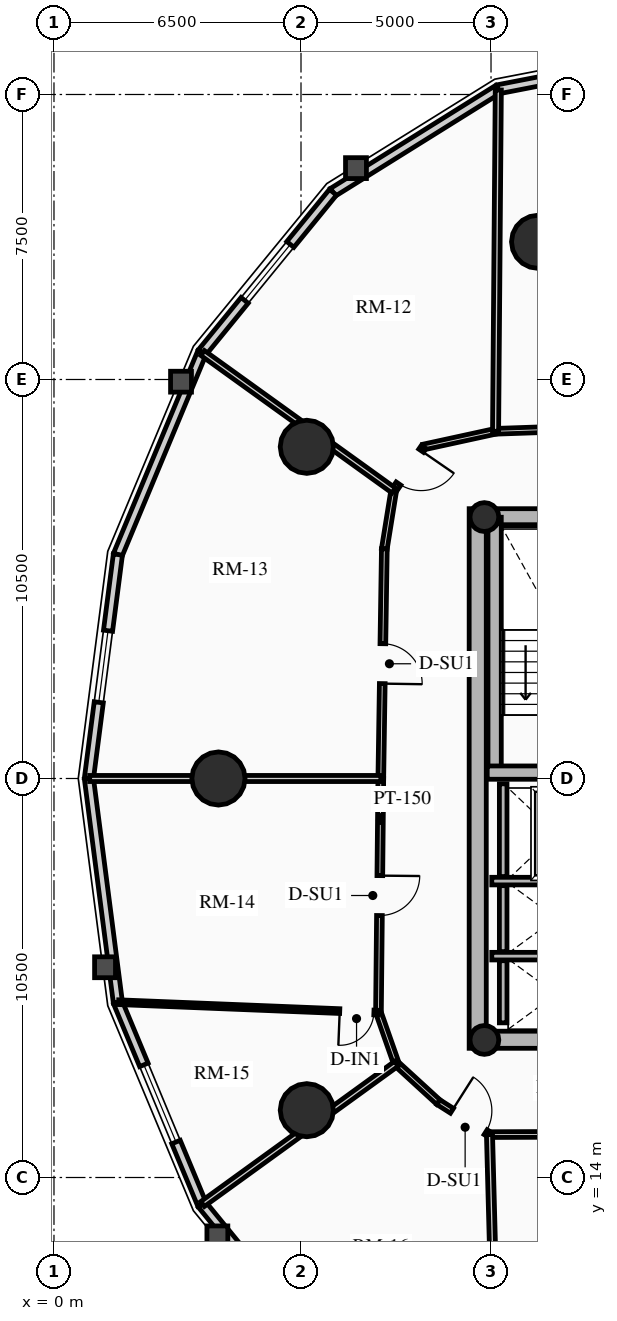
"""IFC4 building model, lengths in metres.
Left out: names, types, materials, properties, quantities, classifications, styles, units other than length and angle.
Written with IfcOpenShell. Run it as: python <this file> out.ifc"""

import sys

from ifc_helpers import new_model, si_unit, direction, frame, frame_2d, origin, origin_2d, place, context, subcontext, project, spatial, rectangle, circle, hollow_circle, extrude, source, transform, mapped, element, fill, save


model = new_model("IFC4")
c1 = context("Model", 3, precision=1e-05, world=origin(), true_north=direction((0.0, 1.0)))
c2 = subcontext(c1, "Body", "Model", "MODEL_VIEW")
j1 = project(units=[si_unit("LENGTHUNIT", "METRE"), si_unit("PLANEANGLEUNIT", "RADIAN")], contexts=[c1])
p1 = place(None, origin())
s1 = spatial("IfcSite", under=j1, at=p1, CompositionType="ELEMENT")
p2 = place(p1, origin())
s2 = spatial("IfcBuilding", under=s1, at=p2, CompositionType="ELEMENT")
p3 = place(p2, frame((0.0, 0.0, 81.79)))
s3 = spatial("IfcBuildingStorey", under=s2, at=p3, CompositionType="ELEMENT", Elevation=81.79)
p4 = place(p3, frame((11.15, 17.4, 0.0), z_axis=(0.0, 0.0, 1.0), x_axis=(0.0, 1.0, 0.0)))
e1 = element("IfcWall", 1, at=p4, inside=s3, PredefinedType="SHEAR", context=c2, shape_type="SweptSolid", body=[
    extrude(rectangle(XDim=14.2, YDim=0.45, at=frame_2d((7.1, 0.0))), origin(), (0.0, 0.0, 1.0), 2.91),
])
p5 = place(p3, frame((11.15, 17.625, 0.0), z_axis=(0.0, 0.0, 1.0), x_axis=(1.0, 0.0, 0.0)))
e2 = element("IfcWall", 2, at=p5, inside=s3, PredefinedType="SHEAR", context=c2, shape_type="SweptSolid", body=[
    extrude(rectangle(XDim=10.7, YDim=0.45, at=frame_2d((5.35, 0.0))), origin(), (0.0, 0.0, 1.0), 2.91),
])
m1 = source(origin(), c2, "Body", "SweptSolid", [
    extrude(rectangle(XDim=1.5, YDim=2.02, at=frame_2d((0.75, 1.01))), frame((0.0, 0.235, 0.0), z_axis=(0.0, -1.0, 0.0), x_axis=(1.0, 0.0, 0.0)), (0.0, 0.0, 1.0), 0.47),
])
p6 = place(p5, frame((5.45, 0.0, 0.0)))
e3 = element("IfcOpeningElement", 3, at=p6, cuts=e2, PredefinedType="OPENING", context=c2, shape_type="MappedRepresentation", body=[
    mapped(m1, transform((0.0, 0.0, 0.0), x_axis=(1.0, 0.0, 0.0), y_axis=(0.0, 1.0, 0.0), z_axis=(0.0, 0.0, 1.0), scale=1.0)),
])
p7 = place(p3, frame((11.15, 31.375, 0.0), z_axis=(0.0, 0.0, 1.0), x_axis=(1.0, 0.0, 0.0)))
e4 = element("IfcWall", 4, at=p7, inside=s3, PredefinedType="SHEAR", context=c2, shape_type="SweptSolid", body=[
    extrude(rectangle(XDim=10.7, YDim=0.45, at=frame_2d((5.35, 0.0))), origin(), (0.0, 0.0, 1.0), 2.91),
])
p8 = place(p7, frame((4.6, 0.0, 0.0)))
e5 = element("IfcOpeningElement", 5, at=p8, cuts=e4, PredefinedType="OPENING", context=c2, shape_type="MappedRepresentation", body=[
    mapped(m1, transform((0.0, 0.0, 0.0), x_axis=(1.0, 0.0, 0.0), y_axis=(0.0, 1.0, 0.0), z_axis=(0.0, 0.0, 1.0), scale=1.0)),
])
p9 = place(p3, frame((11.595, 24.655, 0.0), z_axis=(0.0, 0.0, 1.0), x_axis=(0.0, 1.0, 0.0)))
e6 = element("IfcWall", 6, at=p9, inside=s3, PredefinedType="SHEAR", context=c2, shape_type="SweptSolid", body=[
    extrude(rectangle(XDim=6.72, YDim=0.35, at=frame_2d((3.36, 0.0))), origin(), (0.0, 0.0, 1.0), 2.91),
])
p10 = place(p3, frame((11.4, 24.655, 0.0), z_axis=(0.0, 0.0, 1.0), x_axis=(1.0, 0.0, 0.0)))
e7 = element("IfcWall", 7, at=p10, inside=s3, PredefinedType="SHEAR", context=c2, shape_type="SweptSolid", body=[
    extrude(rectangle(XDim=3.285, YDim=0.35, at=frame_2d((1.643, 0.0))), origin(), (0.0, 0.0, 1.0), 2.91),
])
for number, where, z_axis, x_axis in (
    (8, (11.325, 17.62, 0.0), (0.0, 0.0, 1.0), (1.0, 0.0, 0.0)),
    (9, (11.325, 31.38, 0.0), (0.0, 0.0, 1.0), (1.0, 0.0, 0.0)),
):
    element("IfcColumn", number, at=place(p3, frame(where, z_axis=z_axis, x_axis=x_axis)), inside=s3, PredefinedType="COLUMN", context=c2, shape_type="SweptSolid", body=[
        extrude(hollow_circle(Radius=0.38, WallThickness=0.032, at=origin_2d()), origin(), (0.0, 0.0, 1.0), 2.91),
    ])
for number, where, z_axis, x_axis in (
    (10, (12.739, 38.623, 0.0), (0.0, 0.0, 1.0), (1.0, 0.0, 0.0)),
    (11, (6.653, 33.229, 0.0), (0.0, 0.0, 1.0), (1.0, 0.0, 0.0)),
    (12, (4.328, 24.5, 0.0), (0.0, 0.0, 1.0), (1.0, 0.0, 0.0)),
    (13, (6.653, 15.771, 0.0), (0.0, 0.0, 1.0), (1.0, 0.0, 0.0)),
):
    element("IfcColumn", number, at=place(p3, frame(where, z_axis=z_axis, x_axis=x_axis)), inside=s3, PredefinedType="USERDEFINED", context=c2, shape_type="SweptSolid", body=[
        extrude(circle(Radius=0.7, at=origin_2d()), origin(), (0.0, 0.0, 1.0), 2.91),
    ])
p11 = place(p3, frame((11.685, 42.637, 0.0), z_axis=(0.0, 0.0, 1.0), x_axis=(0.981723785992, 0.190311344954, 0.0)))
e14 = element("IfcWall", 14, at=p11, inside=s3, PredefinedType="SOLIDWALL", context=c2, shape_type="SweptSolid", body=[
    extrude(rectangle(XDim=4.904, YDim=0.24, at=frame_2d((2.452, 0.0))), origin(), (0.0, 0.0, 1.0), 2.179),
])
m2 = source(origin(), c2, "Body", "SweptSolid", [
    extrude(rectangle(XDim=2.2, YDim=1.35, at=frame_2d((1.1, 0.675))), frame((0.0, 0.13, 0.0), z_axis=(0.0, -1.0, 0.0), x_axis=(1.0, 0.0, 0.0)), (0.0, 0.0, 1.0), 0.26),
])
p12 = place(p11, frame((1.352, 0.0, 0.65)))
e15 = element("IfcOpeningElement", 15, at=p12, cuts=e14, PredefinedType="OPENING", context=c2, shape_type="MappedRepresentation", body=[
    mapped(m2, transform((0.0, 0.0, 0.0), x_axis=(1.0, 0.0, 0.0), y_axis=(0.0, 1.0, 0.0), z_axis=(0.0, 0.0, 1.0), scale=1.0)),
])
p13 = place(p3, frame((7.342, 39.928, 0.0), z_axis=(0.0, 0.0, 1.0), x_axis=(0.848520380187, 0.529162701263, 0.0)))
e16 = element("IfcWall", 16, at=p13, inside=s3, PredefinedType="SOLIDWALL", context=c2, shape_type="SweptSolid", body=[
    extrude(rectangle(XDim=5.119, YDim=0.24, at=frame_2d((2.56, 0.0))), origin(), (0.0, 0.0, 1.0), 2.179),
])
p14 = place(p3, frame((3.895, 35.709, 0.0), z_axis=(0.0, 0.0, 1.0), x_axis=(0.632700781152, 0.77439635945, 0.0)))
e17 = element("IfcWall", 17, at=p14, inside=s3, PredefinedType="SOLIDWALL", context=c2, shape_type="SweptSolid", body=[
    extrude(rectangle(XDim=5.448, YDim=0.24, at=frame_2d((2.724, 0.0))), origin(), (0.0, 0.0, 1.0), 2.179),
])
m3 = source(origin(), c2, "Body", "SweptSolid", [
    extrude(rectangle(XDim=1.9, YDim=1.35, at=frame_2d((0.95, 0.675))), frame((0.0, 0.13, 0.0), z_axis=(0.0, -1.0, 0.0), x_axis=(1.0, 0.0, 0.0)), (0.0, 0.0, 1.0), 0.26),
])
p15 = place(p14, frame((1.774, 0.0, 0.65)))
e18 = element("IfcOpeningElement", 18, at=p15, cuts=e17, PredefinedType="OPENING", context=c2, shape_type="MappedRepresentation", body=[
    mapped(m3, transform((0.0, 0.0, 0.0), x_axis=(1.0, 0.0, 0.0), y_axis=(0.0, 1.0, 0.0), z_axis=(0.0, 0.0, 1.0), scale=1.0)),
])
p16 = place(p3, frame((1.682, 30.393, 0.0), z_axis=(0.0, 0.0, 1.0), x_axis=(0.384344417632, 0.923189779317, 0.0)))
e19 = element("IfcWall", 19, at=p16, inside=s3, PredefinedType="SOLIDWALL", context=c2, shape_type="SweptSolid", body=[
    extrude(rectangle(XDim=5.758, YDim=0.24, at=frame_2d((2.879, 0.0))), origin(), (0.0, 0.0, 1.0), 2.179),
])
p17 = place(p3, frame((0.919, 24.5, 0.0), z_axis=(0.0, 0.0, 1.0), x_axis=(0.128351991996, 0.991728675672, 0.0)))
e20 = element("IfcWall", 20, at=p17, inside=s3, PredefinedType="SOLIDWALL", context=c2, shape_type="SweptSolid", body=[
    extrude(rectangle(XDim=5.942, YDim=0.24, at=frame_2d((2.971, 0.0))), origin(), (0.0, 0.0, 1.0), 2.179),
])
p18 = place(p17, frame((2.021, 0.0, 0.65)))
e21 = element("IfcOpeningElement", 21, at=p18, cuts=e20, PredefinedType="OPENING", context=c2, shape_type="MappedRepresentation", body=[
    mapped(m3, transform((0.0, 0.0, 0.0), x_axis=(1.0, 0.0, 0.0), y_axis=(0.0, 1.0, 0.0), z_axis=(0.0, 0.0, 1.0), scale=1.0)),
])
p19 = place(p3, frame((1.682, 18.607, 0.0), z_axis=(0.0, 0.0, 1.0), x_axis=(-0.128351991996, 0.991728675672, 0.0)))
e22 = element("IfcWall", 22, at=p19, inside=s3, PredefinedType="SOLIDWALL", context=c2, shape_type="SweptSolid", body=[
    extrude(rectangle(XDim=5.942, YDim=0.24, at=frame_2d((2.971, 0.0))), origin(), (0.0, 0.0, 1.0), 2.179),
])
p20 = place(p3, frame((3.895, 13.291, 0.0), z_axis=(0.0, 0.0, 1.0), x_axis=(-0.384344417632, 0.923189779317, 0.0)))
e23 = element("IfcWall", 23, at=p20, inside=s3, PredefinedType="SOLIDWALL", context=c2, shape_type="SweptSolid", body=[
    extrude(rectangle(XDim=5.758, YDim=0.24, at=frame_2d((2.879, 0.0))), origin(), (0.0, 0.0, 1.0), 2.179),
])
p21 = place(p20, frame((1.779, 0.0, 0.65)))
e24 = element("IfcOpeningElement", 24, at=p21, cuts=e23, PredefinedType="OPENING", context=c2, shape_type="MappedRepresentation", body=[
    mapped(m2, transform((0.0, 0.0, 0.0), x_axis=(1.0, 0.0, 0.0), y_axis=(0.0, 1.0, 0.0), z_axis=(0.0, 0.0, 1.0), scale=1.0)),
])
p22 = place(p3, frame((7.342, 9.072, 0.0), z_axis=(0.0, 0.0, 1.0), x_axis=(-0.632700781152, 0.77439635945, 0.0)))
e25 = element("IfcWall", 25, at=p22, inside=s3, PredefinedType="SOLIDWALL", context=c2, shape_type="SweptSolid", body=[
    extrude(rectangle(XDim=5.448, YDim=0.24, at=frame_2d((2.724, 0.0))), origin(), (0.0, 0.0, 1.0), 2.179),
])
p23 = place(p3, frame((11.52, 21.8, 0.0), z_axis=(0.0, 0.0, 1.0), x_axis=(1.0, 0.0, 0.0)))
e26 = element("IfcWall", 26, at=p23, inside=s3, PredefinedType="SHEAR", context=c2, shape_type="SweptSolid", body=[
    extrude(rectangle(XDim=2.97, YDim=0.2, at=frame_2d((1.485, 0.0))), origin(), (0.0, 0.0, 1.0), 2.91),
])
p24 = place(p3, frame((11.82, 21.92, 0.0), z_axis=(0.0, 0.0, 1.0), x_axis=(0.0, 1.0, 0.0)))
e27 = element("IfcWall", 27, at=p24, inside=s3, PredefinedType="SHEAR", context=c2, shape_type="SweptSolid", body=[
    extrude(rectangle(XDim=2.44, YDim=0.2, at=frame_2d((1.22, 0.0))), origin(), (0.0, 0.0, 1.0), 2.91),
])
p25 = place(p3, frame((11.52, 19.825, 0.0), z_axis=(0.0, 0.0, 1.0), x_axis=(1.0, 0.0, 0.0)))
e28 = element("IfcWall", 28, at=p25, inside=s3, PredefinedType="SHEAR", context=c2, shape_type="SweptSolid", body=[
    extrude(rectangle(XDim=2.97, YDim=0.2, at=frame_2d((1.485, 0.0))), origin(), (0.0, 0.0, 1.0), 2.91),
])
p26 = place(p3, frame((11.82, 19.945, 0.0), z_axis=(0.0, 0.0, 1.0), x_axis=(0.0, 1.0, 0.0)))
e29 = element("IfcWall", 29, at=p26, inside=s3, PredefinedType="SHEAR", context=c2, shape_type="SweptSolid", body=[
    extrude(rectangle(XDim=1.735, YDim=0.2, at=frame_2d((0.867, 0.0))), origin(), (0.0, 0.0, 1.0), 2.91),
])
p27 = place(p3, frame((11.82, 18.07, 0.0), z_axis=(0.0, 0.0, 1.0), x_axis=(0.0, 1.0, 0.0)))
e30 = element("IfcWall", 30, at=p27, inside=s3, PredefinedType="SHEAR", context=c2, shape_type="SweptSolid", body=[
    extrude(rectangle(XDim=1.635, YDim=0.2, at=frame_2d((0.817, 0.0))), origin(), (0.0, 0.0, 1.0), 2.91),
])
p28 = place(p3, frame((18.143, 33.86, 0.0), z_axis=(0.0, 0.0, 1.0), x_axis=(-0.999419208319, -0.034077060363, 0.0)))
e31 = element("IfcWall", 31, at=p28, inside=s3, PredefinedType="PARTITIONING", context=c2, shape_type="SweptSolid", body=[
    extrude(rectangle(XDim=6.527, YDim=0.15, at=frame_2d((3.263, 0.0))), origin(), (0.0, 0.0, 1.0), 2.225),
])
m4 = source(origin(), c2, "Body", "SweptSolid", [
    extrude(rectangle(XDim=1.05, YDim=2.015, at=frame_2d((0.525, 1.007))), frame((0.0, 0.085, 0.0), z_axis=(0.0, -1.0, 0.0), x_axis=(1.0, 0.0, 0.0)), (0.0, 0.0, 1.0), 0.17),
])
p29 = place(p28, frame((2.738, 0.0, 0.0)))
e32 = element("IfcOpeningElement", 32, at=p29, cuts=e31, PredefinedType="OPENING", context=c2, shape_type="MappedRepresentation", body=[
    mapped(m4, transform((0.0, 0.0, 0.0), x_axis=(1.0, 0.0, 0.0), y_axis=(0.0, 1.0, 0.0), z_axis=(0.0, 0.0, 1.0), scale=1.0)),
])
p30 = place(p3, frame((11.62, 33.637, 0.0), z_axis=(0.0, 0.0, 1.0), x_axis=(-0.97702579435, -0.213121085711, 0.0)))
e33 = element("IfcWall", 33, at=p30, inside=s3, PredefinedType="PARTITIONING", context=c2, shape_type="SweptSolid", body=[
    extrude(rectangle(XDim=1.935, YDim=0.15, at=frame_2d((0.967, 0.0))), origin(), (0.0, 0.0, 1.0), 2.225),
])
p31 = place(p3, frame((9.729, 33.225, 0.0), z_axis=(0.0, 0.0, 1.0), x_axis=(-0.567183649484, -0.82359134755, 0.0)))
e34 = element("IfcWall", 34, at=p31, inside=s3, PredefinedType="PARTITIONING", context=c2, shape_type="SweptSolid", body=[
    extrude(rectangle(XDim=1.392, YDim=0.15, at=frame_2d((0.696, 0.0))), origin(), (0.0, 0.0, 1.0), 2.225),
])
p32 = place(p31, frame((0.12, 0.0, 0.0)))
e35 = element("IfcOpeningElement", 35, at=p32, cuts=e34, PredefinedType="OPENING", context=c2, shape_type="MappedRepresentation", body=[
    mapped(m4, transform((0.0, 0.0, 0.0), x_axis=(1.0, 0.0, 0.0), y_axis=(0.0, 1.0, 0.0), z_axis=(0.0, 0.0, 1.0), scale=1.0)),
])
p33 = place(p3, frame((8.94, 32.078, 0.0), z_axis=(0.0, 0.0, 1.0), x_axis=(-0.159148467753, -0.98725466077, 0.0)))
e36 = element("IfcWall", 36, at=p33, inside=s3, PredefinedType="PARTITIONING", context=c2, shape_type="SweptSolid", body=[
    extrude(rectangle(XDim=1.554, YDim=0.15, at=frame_2d((0.777, 0.0))), origin(), (0.0, 0.0, 1.0), 2.225),
])
p34 = place(p3, frame((8.693, 30.544, 0.0), z_axis=(0.0, 0.0, 1.0), x_axis=(-0.015307007986, -0.99988284089, 0.0)))
e37 = element("IfcWall", 37, at=p34, inside=s3, PredefinedType="PARTITIONING", context=c2, shape_type="SweptSolid", body=[
    extrude(rectangle(XDim=6.045, YDim=0.15, at=frame_2d((3.022, 0.0))), origin(), (0.0, 0.0, 1.0), 2.655),
])
p35 = place(p34, frame((2.497, 0.0, 0.0)))
e38 = element("IfcOpeningElement", 38, at=p35, cuts=e37, PredefinedType="OPENING", context=c2, shape_type="MappedRepresentation", body=[
    mapped(m4, transform((0.0, 0.0, 0.0), x_axis=(1.0, 0.0, 0.0), y_axis=(0.0, 1.0, 0.0), z_axis=(0.0, 0.0, 1.0), scale=1.0)),
])
p36 = place(p3, frame((8.6, 24.5, 0.0), z_axis=(0.0, 0.0, 1.0), x_axis=(-0.010023665349, -0.999949761805, 0.0)))
e39 = element("IfcWall", 39, at=p36, inside=s3, PredefinedType="PARTITIONING", context=c2, shape_type="SweptSolid", body=[
    extrude(rectangle(XDim=6.162, YDim=0.15, at=frame_2d((3.081, 0.0))), origin(), (0.0, 0.0, 1.0), 2.225),
])
p37 = place(p36, frame((2.556, 0.0, 0.0)))
e40 = element("IfcOpeningElement", 40, at=p37, cuts=e39, PredefinedType="OPENING", context=c2, shape_type="MappedRepresentation", body=[
    mapped(m4, transform((0.0, 0.0, 0.0), x_axis=(1.0, 0.0, 0.0), y_axis=(0.0, 1.0, 0.0), z_axis=(0.0, 0.0, 1.0), scale=1.0)),
])
p38 = place(p3, frame((8.538, 18.338, 0.0), z_axis=(0.0, 0.0, 1.0), x_axis=(0.331358150167, -0.94350504838, 0.0)))
e41 = element("IfcWall", 41, at=p38, inside=s3, PredefinedType="PARTITIONING", context=c2, shape_type="SweptSolid", body=[
    extrude(rectangle(XDim=1.424, YDim=0.15, at=frame_2d((0.712, 0.0))), origin(), (0.0, 0.0, 1.0), 2.225),
])
p39 = place(p3, frame((9.01, 16.994, 0.0), z_axis=(0.0, 0.0, 1.0), x_axis=(0.737701798986, -0.67512669609, 0.0)))
e42 = element("IfcWall", 42, at=p39, inside=s3, PredefinedType="PARTITIONING", context=c2, shape_type="SweptSolid", body=[
    extrude(rectangle(XDim=1.498, YDim=0.15, at=frame_2d((0.749, 0.0))), origin(), (0.0, 0.0, 1.0), 2.225),
])
p40 = place(p3, frame((10.115, 15.983, 0.0), z_axis=(0.0, 0.0, 1.0), x_axis=(0.843995849351, -0.536349705209, 0.0)))
e43 = element("IfcWall", 43, at=p40, inside=s3, PredefinedType="PARTITIONING", context=c2, shape_type="SweptSolid", body=[
    extrude(rectangle(XDim=1.593, YDim=0.15, at=frame_2d((0.796, 0.0))), origin(), (0.0, 0.0, 1.0), 2.225),
])
p41 = place(p40, frame((0.423, 0.0, 0.0)))
e44 = element("IfcOpeningElement", 44, at=p41, cuts=e43, PredefinedType="OPENING", context=c2, shape_type="MappedRepresentation", body=[
    mapped(m4, transform((0.0, 0.0, 0.0), x_axis=(1.0, 0.0, 0.0), y_axis=(0.0, 1.0, 0.0), z_axis=(0.0, 0.0, 1.0), scale=1.0)),
])
p42 = place(p3, frame((11.46, 15.129, 0.0), z_axis=(0.0, 0.0, 1.0), x_axis=(0.999993513287, 0.003601858435, 0.0)))
e45 = element("IfcWall", 45, at=p42, inside=s3, PredefinedType="PARTITIONING", context=c2, shape_type="SweptSolid", body=[
    extrude(rectangle(XDim=3.321, YDim=0.15, at=frame_2d((1.661, 0.0))), origin(), (0.0, 0.0, 1.0), 2.225),
])
p43 = place(p3, frame((11.62, 33.637, 0.0), z_axis=(0.0, 0.0, 1.0), x_axis=(0.007965167065, 0.999968277554, 0.0)))
e46 = element("IfcWall", 46, at=p43, inside=s3, PredefinedType="PARTITIONING", context=c2, shape_type="SweptSolid", body=[
    extrude(rectangle(XDim=8.981, YDim=0.16, at=frame_2d((4.49, 0.0))), origin(), (0.0, 0.0, 1.0), 2.179),
])
p44 = place(p3, frame((8.94, 32.078, 0.0), z_axis=(0.0, 0.0, 1.0), x_axis=(-0.811689023641, 0.584089829479, 0.0)))
e47 = element("IfcWall", 47, at=p44, inside=s3, PredefinedType="PARTITIONING", context=c2, shape_type="SweptSolid", body=[
    extrude(rectangle(XDim=6.196, YDim=0.16, at=frame_2d((3.098, 0.0))), origin(), (0.0, 0.0, 1.0), 2.179),
])
p45 = place(p3, frame((8.6, 24.5, 0.0), z_axis=(0.0, 0.0, 1.0), x_axis=(-1.0, 0.0, 0.0)))
e48 = element("IfcWall", 48, at=p45, inside=s3, PredefinedType="PARTITIONING", context=c2, shape_type="SweptSolid", body=[
    extrude(rectangle(XDim=7.661, YDim=0.16, at=frame_2d((3.831, 0.0))), origin(), (0.0, 0.0, 1.0), 2.179),
])
p46 = place(p3, frame((9.01, 16.994, 0.0), z_axis=(0.0, 0.0, 1.0), x_axis=(-0.81001707524, -0.586406290741, 0.0)))
e49 = element("IfcWall", 49, at=p46, inside=s3, PredefinedType="PARTITIONING", context=c2, shape_type="SweptSolid", body=[
    extrude(rectangle(XDim=6.295, YDim=0.16, at=frame_2d((3.148, 0.0))), origin(), (0.0, 0.0, 1.0), 2.179),
])
p47 = place(p3, frame((11.46, 15.129, 0.0), z_axis=(0.0, 0.0, 1.0), x_axis=(0.026480592098, -0.999649327636, 0.0)))
e50 = element("IfcWall", 50, at=p47, inside=s3, PredefinedType="PARTITIONING", context=c2, shape_type="SweptSolid", body=[
    extrude(rectangle(XDim=8.75, YDim=0.16, at=frame_2d((4.375, 0.0))), origin(), (0.0, 0.0, 1.0), 2.179),
])
p48 = place(p3, frame((8.538, 18.338, 0.0), z_axis=(0.0, 0.0, 1.0), x_axis=(-0.999191355531, 0.04020740021, 0.0)))
e51 = element("IfcWall", 51, at=p48, inside=s3, PredefinedType="PARTITIONING", context=c2, shape_type="SweptSolid", body=[
    extrude(rectangle(XDim=6.843, YDim=0.125, at=frame_2d((3.422, 0.0))), origin(), (0.0, 0.0, 1.0), 2.179),
])
m5 = source(origin(), c2, "Body", "SweptSolid", [
    extrude(rectangle(XDim=0.9, YDim=2.005, at=frame_2d((0.45, 1.002))), frame((0.0, 0.073, 0.0), z_axis=(0.0, -1.0, 0.0), x_axis=(1.0, 0.0, 0.0)), (0.0, 0.0, 1.0), 0.145),
])
p49 = place(p48, frame((0.12, 0.0, 0.0)))
e52 = element("IfcOpeningElement", 52, at=p49, cuts=e51, PredefinedType="OPENING", context=c2, shape_type="MappedRepresentation", body=[
    mapped(m5, transform((0.0, 0.0, 0.0), x_axis=(1.0, 0.0, 0.0), y_axis=(0.0, 1.0, 0.0), z_axis=(0.0, 0.0, 1.0), scale=1.0)),
])
m6 = source(origin(), c2, "Body", "SweptSolid", [
    extrude(rectangle(XDim=1.9, YDim=1.35, at=frame_2d((0.95, 0.675))), frame((0.0, 0.03, 0.0), z_axis=(0.0, -1.0, 0.0), x_axis=(1.0, 0.0, 0.0)), (0.0, 0.0, 1.0), 0.06),
])
p50 = place(p15, origin())
e53 = element("IfcWindow", 53, at=p50, inside=s3, PartitioningType="DOUBLE_PANEL_VERTICAL", PredefinedType="WINDOW", context=c2, shape_type="MappedRepresentation", body=[
    mapped(m6, transform((0.0, 0.0, 0.0), x_axis=(1.0, 0.0, 0.0), y_axis=(0.0, 1.0, 0.0), z_axis=(0.0, 0.0, 1.0), scale=1.0)),
])
fill(e18, e53)
p51 = place(p18, origin())
e54 = element("IfcWindow", 54, at=p51, inside=s3, PartitioningType="DOUBLE_PANEL_VERTICAL", PredefinedType="WINDOW", context=c2, shape_type="MappedRepresentation", body=[
    mapped(m6, transform((0.0, 0.0, 0.0), x_axis=(1.0, 0.0, 0.0), y_axis=(0.0, 1.0, 0.0), z_axis=(0.0, 0.0, 1.0), scale=1.0)),
])
fill(e21, e54)
m7 = source(origin(), c2, "Body", "SweptSolid", [
    extrude(rectangle(XDim=2.2, YDim=1.35, at=frame_2d((1.1, 0.675))), frame((0.0, 0.03, 0.0), z_axis=(0.0, -1.0, 0.0), x_axis=(1.0, 0.0, 0.0)), (0.0, 0.0, 1.0), 0.06),
])
p52 = place(p21, origin())
e55 = element("IfcWindow", 55, at=p52, inside=s3, PartitioningType="DOUBLE_PANEL_VERTICAL", PredefinedType="WINDOW", context=c2, shape_type="MappedRepresentation", body=[
    mapped(m7, transform((0.0, 0.0, 0.0), x_axis=(1.0, 0.0, 0.0), y_axis=(0.0, 1.0, 0.0), z_axis=(0.0, 0.0, 1.0), scale=1.0)),
])
fill(e24, e55)
m8 = source(origin(), c2, "Body", "SweptSolid", [
    extrude(rectangle(XDim=1.05, YDim=2.015, at=frame_2d((0.525, 1.007))), frame((0.0, 0.025, 0.0), z_axis=(0.0, -1.0, 0.0), x_axis=(1.0, 0.0, 0.0)), (0.0, 0.0, 1.0), 0.05),
])
p53 = place(p32, origin())
e56 = element("IfcDoor", 56, at=p53, inside=s3, OperationType="SINGLE_SWING_LEFT", PredefinedType="DOOR", context=c2, shape_type="MappedRepresentation", body=[
    mapped(m8, transform((0.0, 0.0, 0.0), x_axis=(1.0, 0.0, 0.0), y_axis=(0.0, 1.0, 0.0), z_axis=(0.0, 0.0, 1.0), scale=1.0)),
])
fill(e35, e56)
p54 = place(p35, origin())
e57 = element("IfcDoor", 57, at=p54, inside=s3, OperationType="SINGLE_SWING_RIGHT", PredefinedType="DOOR", context=c2, shape_type="MappedRepresentation", body=[
    mapped(m8, transform((0.0, 0.0, 0.0), x_axis=(1.0, 0.0, 0.0), y_axis=(0.0, 1.0, 0.0), z_axis=(0.0, 0.0, 1.0), scale=1.0)),
])
fill(e38, e57)
p55 = place(p37, origin())
e58 = element("IfcDoor", 58, at=p55, inside=s3, OperationType="SINGLE_SWING_LEFT", PredefinedType="DOOR", context=c2, shape_type="MappedRepresentation", body=[
    mapped(m8, transform((0.0, 0.0, 0.0), x_axis=(1.0, 0.0, 0.0), y_axis=(0.0, 1.0, 0.0), z_axis=(0.0, 0.0, 1.0), scale=1.0)),
])
fill(e40, e58)
m9 = source(origin(), c2, "Body", "SweptSolid", [
    extrude(rectangle(XDim=0.9, YDim=2.005, at=frame_2d((0.45, 1.002))), frame((0.0, 0.025, 0.0), z_axis=(0.0, -1.0, 0.0), x_axis=(1.0, 0.0, 0.0)), (0.0, 0.0, 1.0), 0.05),
])
p56 = place(p49, origin())
e59 = element("IfcDoor", 59, at=p56, inside=s3, OperationType="SINGLE_SWING_RIGHT", PredefinedType="DOOR", context=c2, shape_type="MappedRepresentation", body=[
    mapped(m9, transform((0.0, 0.0, 0.0), x_axis=(1.0, 0.0, 0.0), y_axis=(0.0, 1.0, 0.0), z_axis=(0.0, 0.0, 1.0), scale=1.0)),
])
fill(e52, e59)
p57 = place(p41, origin())
e60 = element("IfcDoor", 60, at=p57, inside=s3, OperationType="SINGLE_SWING_LEFT", PredefinedType="DOOR", context=c2, shape_type="MappedRepresentation", body=[
    mapped(m8, transform((0.0, 0.0, 0.0), x_axis=(1.0, 0.0, 0.0), y_axis=(0.0, 1.0, 0.0), z_axis=(0.0, 0.0, 1.0), scale=1.0)),
])
fill(e44, e60)
save(model, sys.argv[1])
